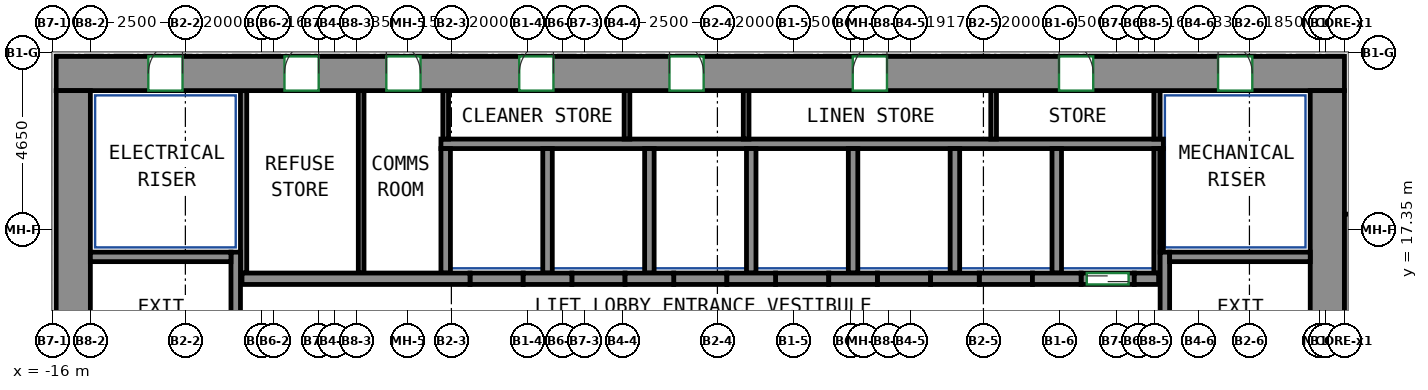
"""IFC4 building model, lengths in metres.
Left out: names, types, materials, properties, quantities, classifications, styles, units other than length and angle.
Written with IfcOpenShell. Run it as: python <this file> out.ifc"""

import sys

from ifc_helpers import new_model, si_unit, direction, frame, frame_2d, origin, place, context, subcontext, project, spatial, rectangle, extrude, source, transform, mapped, element, fill, save


model = new_model("IFC4")
c1 = context("Model", 3, precision=1e-05, world=origin(), true_north=direction((0.0, 1.0)))
c2 = subcontext(c1, "Body", "Model", "MODEL_VIEW")
j1 = project(units=[si_unit("LENGTHUNIT", "METRE"), si_unit("PLANEANGLEUNIT", "RADIAN")], contexts=[c1])
p1 = place(None, origin())
s1 = spatial("IfcSite", under=j1, at=p1, CompositionType="ELEMENT")
p2 = place(p1, origin())
s2 = spatial("IfcBuilding", under=s1, at=p2, CompositionType="ELEMENT")
p3 = place(p2, frame((0.0, 0.0, 112.6)))
s3 = spatial("IfcBuildingStorey", under=s2, at=p3, CompositionType="ELEMENT", Elevation=112.6)
m1 = source(origin(), c2, "Body", "SweptSolid", [
    extrude(rectangle(XDim=33.9, YDim=0.9, at=frame_2d((16.95, 0.0))), origin(), (0.0, 0.0, 1.0), 3.72),
])
p4 = place(p3, frame((-15.9, 21.45, 0.0), z_axis=(0.0, 0.0, 1.0), x_axis=(1.0, 0.0, 0.0)))
e1 = element("IfcWall", 1, at=p4, inside=s3, PredefinedType="SHEAR", context=c2, shape_type="MappedRepresentation", body=[
    mapped(m1, transform((0.0, 0.0, 0.0))),
])
p5 = place(p4, frame((6.008, 0.0, 0.0)))
e2 = element("IfcOpeningElement", 2, at=p5, cuts=e1, PredefinedType="OPENING", context=c2, shape_type="SweptSolid", body=[
    extrude(rectangle(XDim=0.9, YDim=2.1, at=frame_2d((0.45, 1.05))), frame((0.0, 0.46, 0.0), z_axis=(0.0, -1.0, 0.0), x_axis=(1.0, 0.0, 0.0)), (0.0, 0.0, 1.0), 0.92),
])
p6 = place(p4, frame((8.688, 0.0, 0.0)))
e3 = element("IfcOpeningElement", 3, at=p6, cuts=e1, PredefinedType="OPENING", context=c2, shape_type="SweptSolid", body=[
    extrude(rectangle(XDim=0.9, YDim=2.1, at=frame_2d((0.45, 1.05))), frame((0.0, 0.46, 0.0), z_axis=(0.0, -1.0, 0.0), x_axis=(1.0, 0.0, 0.0)), (0.0, 0.0, 1.0), 0.92),
])
p7 = place(p4, frame((12.185, 0.0, 0.0)))
e4 = element("IfcOpeningElement", 4, at=p7, cuts=e1, PredefinedType="OPENING", context=c2, shape_type="SweptSolid", body=[
    extrude(rectangle(XDim=0.9, YDim=2.1, at=frame_2d((0.45, 1.05))), frame((0.0, 0.46, 0.0), z_axis=(0.0, -1.0, 0.0), x_axis=(1.0, 0.0, 0.0)), (0.0, 0.0, 1.0), 0.92),
])
p8 = place(p4, frame((16.138, 0.0, 0.0)))
e5 = element("IfcOpeningElement", 5, at=p8, cuts=e1, PredefinedType="OPENING", context=c2, shape_type="SweptSolid", body=[
    extrude(rectangle(XDim=0.9, YDim=2.1, at=frame_2d((0.45, 1.05))), frame((0.0, 0.46, 0.0), z_axis=(0.0, -1.0, 0.0), x_axis=(1.0, 0.0, 0.0)), (0.0, 0.0, 1.0), 0.92),
])
p9 = place(p4, frame((20.962, 0.0, 0.0)))
e6 = element("IfcOpeningElement", 6, at=p9, cuts=e1, PredefinedType="OPENING", context=c2, shape_type="SweptSolid", body=[
    extrude(rectangle(XDim=0.9, YDim=2.1, at=frame_2d((0.45, 1.05))), frame((0.0, 0.46, 0.0), z_axis=(0.0, -1.0, 0.0), x_axis=(1.0, 0.0, 0.0)), (0.0, 0.0, 1.0), 0.92),
])
p10 = place(p4, frame((26.389, 0.0, 0.0)))
e7 = element("IfcOpeningElement", 7, at=p10, cuts=e1, PredefinedType="OPENING", context=c2, shape_type="SweptSolid", body=[
    extrude(rectangle(XDim=0.9, YDim=2.1, at=frame_2d((0.45, 1.05))), frame((0.0, 0.46, 0.0), z_axis=(0.0, -1.0, 0.0), x_axis=(1.0, 0.0, 0.0)), (0.0, 0.0, 1.0), 0.92),
])
p11 = place(p4, frame((2.425, 0.0, 0.0)))
e8 = element("IfcOpeningElement", 8, at=p11, cuts=e1, PredefinedType="OPENING", context=c2, shape_type="SweptSolid", body=[
    extrude(rectangle(XDim=0.9, YDim=2.1, at=frame_2d((0.45, 1.05))), frame((0.0, 0.46, 0.0), z_axis=(0.0, -1.0, 0.0), x_axis=(1.0, 0.0, 0.0)), (0.0, 0.0, 1.0), 0.92),
])
p12 = place(p4, frame((30.575, 0.0, 0.0)))
e9 = element("IfcOpeningElement", 9, at=p12, cuts=e1, PredefinedType="OPENING", context=c2, shape_type="SweptSolid", body=[
    extrude(rectangle(XDim=0.9, YDim=2.1, at=frame_2d((0.45, 1.05))), frame((0.0, 0.46, 0.0), z_axis=(0.0, -1.0, 0.0), x_axis=(1.0, 0.0, 0.0)), (0.0, 0.0, 1.0), 0.92),
])
m2 = source(origin(), c2, "Body", "SweptSolid", [
    extrude(rectangle(XDim=12.0, YDim=0.9, at=frame_2d((6.0, 0.0))), origin(), (0.0, 0.0, 1.0), 3.72),
])
for number, where, z_axis, x_axis in (
    (10, (-15.45, 9.0, 0.0), (0.0, 0.0, 1.0), (0.0, 1.0, 0.0)),
    (11, (17.55, 9.0, 0.0), (0.0, 0.0, 1.0), (0.0, 1.0, 0.0)),
):
    element("IfcWall", number, at=place(p3, frame(where, z_axis=z_axis, x_axis=x_axis)), inside=s3, PredefinedType="SHEAR", context=c2, shape_type="MappedRepresentation", body=[
        mapped(m2, transform((0.0, 0.0, 0.0))),
    ])
m3 = source(origin(), c2, "Body", "SweptSolid", [
    extrude(rectangle(XDim=7.75, YDim=0.25, at=frame_2d((3.875, 0.0))), origin(), (0.0, 0.0, 1.0), 3.72),
])
p13 = place(p3, frame((-11.175, 9.0, 0.0), z_axis=(0.0, 0.0, 1.0), x_axis=(0.0, 1.0, 0.0)))
e12 = element("IfcWall", 12, at=p13, inside=s3, PredefinedType="SHEAR", context=c2, shape_type="MappedRepresentation", body=[
    mapped(m3, transform((0.0, 0.0, 0.0))),
])
m4 = source(origin(), c2, "Body", "SweptSolid", [
    extrude(rectangle(XDim=3.7, YDim=0.25, at=frame_2d((1.85, 0.0))), origin(), (0.0, 0.0, 1.0), 3.72),
])
p14 = place(p3, frame((-15.0, 16.625, 0.0), z_axis=(0.0, 0.0, 1.0), x_axis=(1.0, 0.0, 0.0)))
e13 = element("IfcWall", 13, at=p14, inside=s3, PredefinedType="SHEAR", context=c2, shape_type="MappedRepresentation", body=[
    mapped(m4, transform((0.0, 0.0, 0.0))),
])
p15 = place(p3, frame((13.275, 9.0, 0.0), z_axis=(0.0, 0.0, 1.0), x_axis=(0.0, 1.0, 0.0)))
e14 = element("IfcWall", 14, at=p15, inside=s3, PredefinedType="SHEAR", context=c2, shape_type="MappedRepresentation", body=[
    mapped(m3, transform((0.0, 0.0, 0.0))),
])
m5 = source(origin(), c2, "Body", "SweptSolid", [
    extrude(rectangle(XDim=3.7, YDim=0.25, at=frame_2d((1.85, 0.0))), origin(), (0.0, 0.0, 1.0), 3.72),
])
p16 = place(p3, frame((13.4, 16.625, 0.0), z_axis=(0.0, 0.0, 1.0), x_axis=(1.0, 0.0, 0.0)))
e15 = element("IfcWall", 15, at=p16, inside=s3, PredefinedType="SHEAR", context=c2, shape_type="MappedRepresentation", body=[
    mapped(m5, transform((0.0, 0.0, 0.0))),
])
m6 = source(origin(), c2, "Body", "SweptSolid", [
    extrude(rectangle(XDim=8.0, YDim=0.35, at=frame_2d((4.0, 0.0))), origin(), (0.0, 0.0, 1.0), 3.72),
])
p17 = place(p3, frame((18.175, 9.75, 0.0), z_axis=(0.0, 0.0, 1.0), x_axis=(0.0, 1.0, 0.0)))
e16 = element("IfcWall", 16, at=p17, inside=s3, PredefinedType="SHEAR", context=c2, shape_type="MappedRepresentation", body=[
    mapped(m6, transform((0.0, 0.0, 0.0))),
])
m7 = source(origin(), c2, "Body", "SweptSolid", [
    extrude(rectangle(XDim=6.0, YDim=0.3, at=frame_2d((3.0, 0.0))), origin(), (0.0, 0.0, 1.0), 3.72),
])
p18 = place(p3, frame((-11.01, 16.05, 0.0), z_axis=(0.0, 0.0, 1.0), x_axis=(1.0, 0.0, 0.0)))
e17 = element("IfcWall", 17, at=p18, inside=s3, PredefinedType="SHEAR", context=c2, shape_type="MappedRepresentation", body=[
    mapped(m7, transform((0.0, 0.0, 0.0))),
])
m8 = source(origin(), c2, "Body", "SweptSolid", [
    extrude(rectangle(XDim=1.28, YDim=0.3, at=frame_2d((0.64, 0.0))), origin(), (0.0, 0.0, 1.0), 3.72),
])
for number, where, z_axis, x_axis in (
    (18, (-3.61, 16.05, 0.0), (0.0, 0.0, 1.0), (1.0, 0.0, 0.0)),
    (19, (-0.93, 16.05, 0.0), (0.0, 0.0, 1.0), (1.0, 0.0, 0.0)),
    (20, (1.75, 16.05, 0.0), (0.0, 0.0, 1.0), (1.0, 0.0, 0.0)),
    (21, (4.43, 16.05, 0.0), (0.0, 0.0, 1.0), (1.0, 0.0, 0.0)),
):
    element("IfcWall", number, at=place(p3, frame(where, z_axis=z_axis, x_axis=x_axis)), inside=s3, PredefinedType="SHEAR", context=c2, shape_type="MappedRepresentation", body=[
        mapped(m8, transform((0.0, 0.0, 0.0))),
    ])
m9 = source(origin(), c2, "Body", "SweptSolid", [
    extrude(rectangle(XDim=1.28, YDim=0.3, at=frame_2d((0.64, 0.0))), origin(), (0.0, 0.0, 1.0), 3.72),
])
p19 = place(p3, frame((7.11, 16.05, 0.0), z_axis=(0.0, 0.0, 1.0), x_axis=(1.0, 0.0, 0.0)))
e22 = element("IfcWall", 22, at=p19, inside=s3, PredefinedType="SHEAR", context=c2, shape_type="MappedRepresentation", body=[
    mapped(m9, transform((0.0, 0.0, 0.0))),
])
p20 = place(p3, frame((9.79, 16.05, 0.0), z_axis=(0.0, 0.0, 1.0), x_axis=(1.0, 0.0, 0.0)))
e23 = element("IfcWall", 23, at=p20, inside=s3, PredefinedType="SHEAR", context=c2, shape_type="MappedRepresentation", body=[
    mapped(m8, transform((0.0, 0.0, 0.0))),
])
m10 = source(origin(), c2, "Body", "SweptSolid", [
    extrude(rectangle(XDim=0.64, YDim=0.3, at=frame_2d((0.32, 0.0))), origin(), (0.0, 0.0, 1.0), 3.72),
])
p21 = place(p3, frame((12.47, 16.05, 0.0), z_axis=(0.0, 0.0, 1.0), x_axis=(1.0, 0.0, 0.0)))
e24 = element("IfcWall", 24, at=p21, inside=s3, PredefinedType="SHEAR", context=c2, shape_type="MappedRepresentation", body=[
    mapped(m10, transform((0.0, 0.0, 0.0))),
])
m11 = source(origin(), c2, "Body", "SweptSolid", [
    extrude(rectangle(XDim=1.4, YDim=0.3, at=frame_2d((0.7, 0.0))), origin(), (0.0, 0.0, 1.0), 3.72),
])
p22 = place(p3, frame((11.07, 16.05, 0.0), z_axis=(0.0, 0.0, 1.0), x_axis=(1.0, 0.0, 0.0)))
e25 = element("IfcWall", 25, at=p22, inside=s3, PredefinedType="PARTITIONING", context=c2, shape_type="MappedRepresentation", body=[
    mapped(m11, transform((0.0, 0.0, 0.0))),
])
p23 = place(p22, frame((0.15, 0.0, 0.0)))
e26 = element("IfcOpeningElement", 26, at=p23, cuts=e25, PredefinedType="OPENING", context=c2, shape_type="SweptSolid", body=[
    extrude(rectangle(XDim=1.1, YDim=2.1, at=frame_2d((0.55, 1.05))), frame((0.0, 0.16, 0.0), z_axis=(0.0, -1.0, 0.0), x_axis=(1.0, 0.0, 0.0)), (0.0, 0.0, 1.0), 0.32),
])
p24 = place(p3, frame((-5.01, 16.05, 0.0), z_axis=(0.0, 0.0, 1.0), x_axis=(1.0, 0.0, 0.0)))
e27 = element("IfcWall", 27, at=p24, inside=s3, PredefinedType="PARTITIONING", context=c2, shape_type="MappedRepresentation", body=[
    mapped(m11, transform((0.0, 0.0, 0.0))),
])
m12 = source(origin(), c2, "Body", "SweptSolid", [
    extrude(rectangle(XDim=1.4, YDim=0.3, at=frame_2d((0.7, 0.0))), origin(), (0.0, 0.0, 1.0), 3.72),
])
p25 = place(p3, frame((-2.33, 16.05, 0.0), z_axis=(0.0, 0.0, 1.0), x_axis=(1.0, 0.0, 0.0)))
e28 = element("IfcWall", 28, at=p25, inside=s3, PredefinedType="PARTITIONING", context=c2, shape_type="MappedRepresentation", body=[
    mapped(m12, transform((0.0, 0.0, 0.0))),
])
for number, where, z_axis, x_axis in (
    (29, (0.35, 16.05, 0.0), (0.0, 0.0, 1.0), (1.0, 0.0, 0.0)),
    (30, (3.03, 16.05, 0.0), (0.0, 0.0, 1.0), (1.0, 0.0, 0.0)),
):
    element("IfcWall", number, at=place(p3, frame(where, z_axis=z_axis, x_axis=x_axis)), inside=s3, PredefinedType="PARTITIONING", context=c2, shape_type="MappedRepresentation", body=[
        mapped(m11, transform((0.0, 0.0, 0.0))),
    ])
for number, where, z_axis, x_axis in (
    (31, (5.71, 16.05, 0.0), (0.0, 0.0, 1.0), (1.0, 0.0, 0.0)),
    (32, (8.39, 16.05, 0.0), (0.0, 0.0, 1.0), (1.0, 0.0, 0.0)),
):
    element("IfcWall", number, at=place(p3, frame(where, z_axis=z_axis, x_axis=x_axis)), inside=s3, PredefinedType="PARTITIONING", context=c2, shape_type="MappedRepresentation", body=[
        mapped(m12, transform((0.0, 0.0, 0.0))),
    ])
m13 = source(origin(), c2, "Body", "SweptSolid", [
    extrude(rectangle(XDim=19.01, YDim=0.25, at=frame_2d((9.505, 0.0))), origin(), (0.0, 0.0, 1.0), 3.72),
])
p26 = place(p3, frame((-5.775, 19.6, 0.0), z_axis=(0.0, 0.0, 1.0), x_axis=(1.0, 0.0, 0.0)))
e33 = element("IfcWall", 33, at=p26, inside=s3, PredefinedType="PARTITIONING", context=c2, shape_type="MappedRepresentation", body=[
    mapped(m13, transform((0.0, 0.0, 0.0))),
])
m14 = source(origin(), c2, "Body", "SweptSolid", [
    extrude(rectangle(XDim=3.275, YDim=0.165, at=frame_2d((1.638, 0.0))), origin(), (0.0, 0.0, 1.0), 3.72),
])
p27 = place(p3, frame((13.067, 16.2, 0.0), z_axis=(0.0, 0.0, 1.0), x_axis=(0.0, 1.0, 0.0)))
e34 = element("IfcWall", 34, at=p27, inside=s3, PredefinedType="PARTITIONING", context=c2, shape_type="MappedRepresentation", body=[
    mapped(m14, transform((0.0, 0.0, 0.0))),
])
m15 = source(origin(), c2, "Body", "SweptSolid", [
    extrude(rectangle(XDim=1.275, YDim=0.165, at=frame_2d((0.637, 0.0))), origin(), (0.0, 0.0, 1.0), 3.72),
])
p28 = place(p3, frame((13.067, 19.725, 0.0), z_axis=(0.0, 0.0, 1.0), x_axis=(0.0, 1.0, 0.0)))
e35 = element("IfcWall", 35, at=p28, inside=s3, PredefinedType="PARTITIONING", context=c2, shape_type="MappedRepresentation", body=[
    mapped(m15, transform((0.0, 0.0, 0.0))),
])
m16 = source(origin(), c2, "Body", "SweptSolid", [
    extrude(rectangle(XDim=4.8, YDim=0.165, at=frame_2d((2.4, 0.0))), origin(), (0.0, 0.0, 1.0), 3.72),
])
p29 = place(p3, frame((-10.968, 16.2, 0.0), z_axis=(0.0, 0.0, 1.0), x_axis=(0.0, 1.0, 0.0)))
e36 = element("IfcWall", 36, at=p29, inside=s3, PredefinedType="PARTITIONING", context=c2, shape_type="MappedRepresentation", body=[
    mapped(m16, transform((0.0, 0.0, 0.0))),
])
m17 = source(origin(), c2, "Body", "SweptSolid", [
    extrude(rectangle(XDim=3.275, YDim=0.25, at=frame_2d((1.638, 0.0))), origin(), (0.0, 0.0, 1.0), 3.72),
])
p30 = place(p3, frame((10.43, 16.2, 0.0), z_axis=(0.0, 0.0, 1.0), x_axis=(0.0, 1.0, 0.0)))
e37 = element("IfcWall", 37, at=p30, inside=s3, PredefinedType="PARTITIONING", context=c2, shape_type="MappedRepresentation", body=[
    mapped(m17, transform((0.0, 0.0, 0.0))),
])
m18 = source(origin(), c2, "Body", "SweptSolid", [
    extrude(rectangle(XDim=2.725, YDim=0.085, at=frame_2d((1.363, 0.0))), origin(), (0.0, 0.0, 1.0), 3.72),
])
p31 = place(p3, frame((13.192, 16.75, 0.0), z_axis=(0.0, 0.0, 1.0), x_axis=(0.0, 1.0, 0.0)))
e38 = element("IfcWall", 38, at=p31, inside=s3, PredefinedType="PARTITIONING", context=c2, shape_type="MappedRepresentation", body=[
    mapped(m18, transform((0.0, 0.0, 0.0))),
])
for number, where, z_axis, x_axis in (
    (39, (2.39, 16.2, 0.0), (0.0, 0.0, 1.0), (0.0, 1.0, 0.0)),
    (40, (5.07, 16.2, 0.0), (0.0, 0.0, 1.0), (0.0, 1.0, 0.0)),
    (41, (7.75, 16.2, 0.0), (0.0, 0.0, 1.0), (0.0, 1.0, 0.0)),
    (42, (-0.29, 16.2, 0.0), (0.0, 0.0, 1.0), (0.0, 1.0, 0.0)),
    (43, (-2.97, 16.2, 0.0), (0.0, 0.0, 1.0), (0.0, 1.0, 0.0)),
    (44, (-5.65, 16.2, 0.0), (0.0, 0.0, 1.0), (0.0, 1.0, 0.0)),
):
    element("IfcWall", number, at=place(p3, frame(where, z_axis=z_axis, x_axis=x_axis)), inside=s3, PredefinedType="PARTITIONING", context=c2, shape_type="MappedRepresentation", body=[
        mapped(m17, transform((0.0, 0.0, 0.0))),
    ])
m19 = source(origin(), c2, "Body", "SweptSolid", [
    extrude(rectangle(XDim=4.8, YDim=0.15, at=frame_2d((2.4, 0.0))), origin(), (0.0, 0.0, 1.0), 3.72),
])
p32 = place(p3, frame((-7.875, 16.2, 0.0), z_axis=(0.0, 0.0, 1.0), x_axis=(0.0, 1.0, 0.0)))
e45 = element("IfcWall", 45, at=p32, inside=s3, PredefinedType="PARTITIONING", context=c2, shape_type="MappedRepresentation", body=[
    mapped(m19, transform((0.0, 0.0, 0.0))),
])
m20 = source(origin(), c2, "Body", "SweptSolid", [
    extrude(rectangle(XDim=1.275, YDim=0.15, at=frame_2d((0.637, 0.0))), origin(), (0.0, 0.0, 1.0), 3.72),
])
for number, where, z_axis, x_axis in (
    (46, (-5.65, 19.725, 0.0), (0.0, 0.0, 1.0), (0.0, 1.0, 0.0)),
    (47, (-0.88, 19.725, 0.0), (0.0, 0.0, 1.0), (0.0, 1.0, 0.0)),
    (48, (2.256, 19.725, 0.0), (0.0, 0.0, 1.0), (0.0, 1.0, 0.0)),
    (49, (8.768, 19.725, 0.0), (0.0, 0.0, 1.0), (0.0, 1.0, 0.0)),
):
    element("IfcWall", number, at=place(p3, frame(where, z_axis=z_axis, x_axis=x_axis)), inside=s3, PredefinedType="PARTITIONING", context=c2, shape_type="MappedRepresentation", body=[
        mapped(m20, transform((0.0, 0.0, 0.0))),
    ])
p33 = place(p23, origin())
e50 = element("IfcDoor", 50, at=p33, inside=s3, OperationType="DOUBLE_DOOR_SLIDING", PredefinedType="DOOR", context=c2, shape_type="SweptSolid", body=[
    extrude(rectangle(XDim=1.1, YDim=2.1, at=frame_2d((0.55, 1.05))), frame((0.0, 0.025, 0.0), z_axis=(0.0, -1.0, 0.0), x_axis=(1.0, 0.0, 0.0)), (0.0, 0.0, 1.0), 0.05),
])
fill(e26, e50)
p34 = place(p5, origin())
e51 = element("IfcDoor", 51, at=p34, inside=s3, OperationType="SINGLE_SWING_RIGHT", PredefinedType="DOOR", context=c2, shape_type="SweptSolid", body=[
    extrude(rectangle(XDim=0.9, YDim=2.1, at=frame_2d((0.45, 1.05))), frame((0.0, -0.305, 0.0), z_axis=(0.0, -1.0, 0.0), x_axis=(1.0, 0.0, 0.0)), (0.0, 0.0, 1.0), 0.05),
])
fill(e2, e51)
p35 = place(p6, origin())
e52 = element("IfcDoor", 52, at=p35, inside=s3, OperationType="SINGLE_SWING_LEFT", PredefinedType="DOOR", context=c2, shape_type="SweptSolid", body=[
    extrude(rectangle(XDim=0.9, YDim=2.1, at=frame_2d((0.45, 1.05))), frame((0.0, -0.305, 0.0), z_axis=(0.0, -1.0, 0.0), x_axis=(1.0, 0.0, 0.0)), (0.0, 0.0, 1.0), 0.05),
])
fill(e3, e52)
p36 = place(p7, origin())
e53 = element("IfcDoor", 53, at=p36, inside=s3, OperationType="SINGLE_SWING_RIGHT", PredefinedType="DOOR", context=c2, shape_type="SweptSolid", body=[
    extrude(rectangle(XDim=0.9, YDim=2.1, at=frame_2d((0.45, 1.05))), frame((0.0, -0.305, 0.0), z_axis=(0.0, -1.0, 0.0), x_axis=(1.0, 0.0, 0.0)), (0.0, 0.0, 1.0), 0.05),
])
fill(e4, e53)
p37 = place(p8, origin())
e54 = element("IfcDoor", 54, at=p37, inside=s3, OperationType="SINGLE_SWING_LEFT", PredefinedType="DOOR", context=c2, shape_type="SweptSolid", body=[
    extrude(rectangle(XDim=0.9, YDim=2.1, at=frame_2d((0.45, 1.05))), frame((0.0, -0.305, 0.0), z_axis=(0.0, -1.0, 0.0), x_axis=(1.0, 0.0, 0.0)), (0.0, 0.0, 1.0), 0.05),
])
fill(e5, e54)
p38 = place(p9, origin())
e55 = element("IfcDoor", 55, at=p38, inside=s3, OperationType="SINGLE_SWING_RIGHT", PredefinedType="DOOR", context=c2, shape_type="SweptSolid", body=[
    extrude(rectangle(XDim=0.9, YDim=2.1, at=frame_2d((0.45, 1.05))), frame((0.0, -0.305, 0.0), z_axis=(0.0, -1.0, 0.0), x_axis=(1.0, 0.0, 0.0)), (0.0, 0.0, 1.0), 0.05),
])
fill(e6, e55)
p39 = place(p10, origin())
e56 = element("IfcDoor", 56, at=p39, inside=s3, OperationType="SINGLE_SWING_LEFT", PredefinedType="DOOR", context=c2, shape_type="SweptSolid", body=[
    extrude(rectangle(XDim=0.9, YDim=2.1, at=frame_2d((0.45, 1.05))), frame((0.0, -0.305, 0.0), z_axis=(0.0, -1.0, 0.0), x_axis=(1.0, 0.0, 0.0)), (0.0, 0.0, 1.0), 0.05),
])
fill(e7, e56)
p40 = place(p11, origin())
e57 = element("IfcDoor", 57, at=p40, inside=s3, OperationType="SINGLE_SWING_RIGHT", PredefinedType="DOOR", context=c2, shape_type="SweptSolid", body=[
    extrude(rectangle(XDim=0.9, YDim=2.1, at=frame_2d((0.45, 1.05))), frame((0.0, -0.305, 0.0), z_axis=(0.0, -1.0, 0.0), x_axis=(1.0, 0.0, 0.0)), (0.0, 0.0, 1.0), 0.05),
])
fill(e8, e57)
p41 = place(p12, origin())
e58 = element("IfcDoor", 58, at=p41, inside=s3, OperationType="SINGLE_SWING_LEFT", PredefinedType="DOOR", context=c2, shape_type="SweptSolid", body=[
    extrude(rectangle(XDim=0.9, YDim=2.1, at=frame_2d((0.45, 1.05))), frame((0.0, -0.305, 0.0), z_axis=(0.0, -1.0, 0.0), x_axis=(1.0, 0.0, 0.0)), (0.0, 0.0, 1.0), 0.05),
])
fill(e9, e58)
save(model, sys.argv[1])
